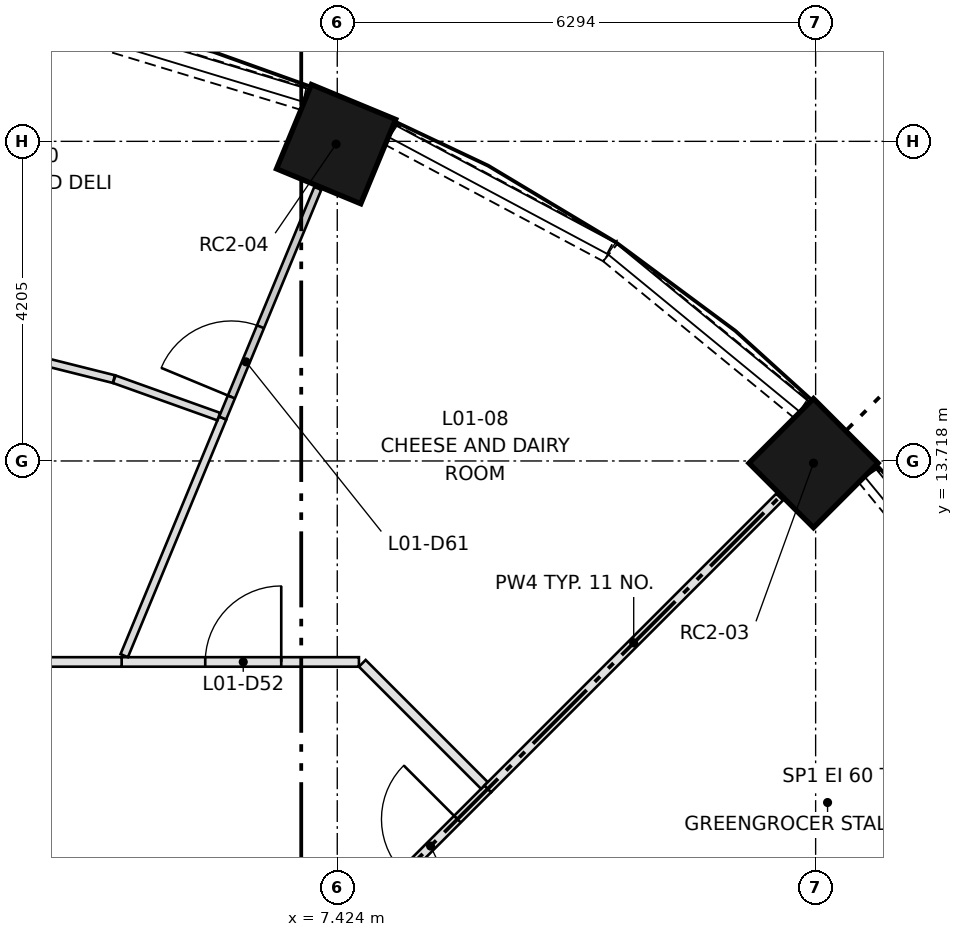
"""IFC4 building model, lengths in metres.
Left out: names, types, materials, properties, quantities, classifications, styles, units other than length and angle.
Written with IfcOpenShell. Run it as: python <this file> out.ifc"""

import sys

from ifc_helpers import new_model, si_unit, direction, frame, frame_2d, origin, origin_2d, place, context, subcontext, project, spatial, rectangle, extrude, element, fill, save


model = new_model("IFC4")
c1 = context("Model", 3, precision=1e-05, world=origin(), true_north=direction((0.0, 1.0)))
c2 = subcontext(c1, "Body", "Model", "MODEL_VIEW")
j1 = project(units=[si_unit("LENGTHUNIT", "METRE"), si_unit("PLANEANGLEUNIT", "RADIAN")], contexts=[c1])
p1 = place(None, origin())
s1 = spatial("IfcSite", under=j1, at=p1, CompositionType="ELEMENT")
p2 = place(p1, origin())
s2 = spatial("IfcBuilding", under=s1, at=p2, CompositionType="ELEMENT")
p3 = place(p2, frame((0.0, 0.0, 5.2)))
s3 = spatial("IfcBuildingStorey", under=s2, at=p3, CompositionType="ELEMENT", Elevation=5.2)
for number, where, z_axis, x_axis in (
    (1, (13.69, 13.69, 0.0), (0.0, 0.0, 1.0), (0.707, 0.707, 0.0)),
    (2, (7.409, 17.886, 0.0), (0.0, 0.0, 1.0), (0.383, 0.924, 0.0)),
):
    element("IfcColumn", number, at=place(p3, frame(where, z_axis=z_axis, x_axis=x_axis)), inside=s3, PredefinedType="COLUMN", context=c2, shape_type="SweptSolid", body=[
        extrude(rectangle(XDim=1.2, YDim=1.2, at=origin_2d()), origin(), (0.0, 0.0, 1.0), 4.7),
    ])
for number, where, z_axis, x_axis in (
    (3, (16.461, 11.018, 0.0), (0.0, 0.0, 1.0), (-0.634, 0.773, 0.0)),
    (4, (13.531, 14.399, 0.0), (0.0, 0.0, 1.0), (-0.773, 0.634, 0.0)),
):
    element("IfcWall", number, at=place(p3, frame(where, z_axis=z_axis, x_axis=x_axis)), inside=s3, PredefinedType="SOLIDWALL", context=c2, shape_type="SweptSolid", body=[
        extrude(rectangle(XDim=3.251, YDim=0.3, at=frame_2d((1.626, 0.0))), origin(), (0.0, 0.0, 1.0), 0.45),
    ])
p4 = place(p3, frame((10.993, 16.478, 0.0), z_axis=(0.0, 0.0, 1.0), x_axis=(-0.881968250723, 0.471308820961, 0.0)))
e5 = element("IfcWall", 5, at=p4, inside=s3, PredefinedType="SOLIDWALL", context=c2, shape_type="SweptSolid", body=[
    extrude(rectangle(XDim=3.252, YDim=0.3, at=frame_2d((1.626, 0.0))), origin(), (0.0, 0.0, 1.0), 0.45),
])
p5 = place(p3, frame((6.99, 18.48, 0.0), z_axis=(0.0, 0.0, 1.0), x_axis=(-0.956935334366, 0.290301164038, 0.0)))
e6 = element("IfcWall", 6, at=p5, inside=s3, PredefinedType="SOLIDWALL", context=c2, shape_type="SweptSolid", body=[
    extrude(rectangle(XDim=3.252, YDim=0.3, at=frame_2d((1.626, 0.0))), origin(), (0.0, 0.0, 1.0), 0.45),
])
p6 = place(p3, frame((7.874, 7.874, 0.0), z_axis=(0.0, 0.0, 1.0), x_axis=(0.707106781187, 0.707106781187, 0.0)))
e7 = element("IfcWall", 7, at=p6, inside=s3, PredefinedType="PARTITIONING", context=c2, shape_type="SweptSolid", body=[
    extrude(rectangle(XDim=2.165, YDim=0.125, at=frame_2d((1.082, 0.0))), origin(), (0.0, 0.0, 1.0), 4.3),
])
p7 = place(p6, frame((0.6, 0.0, 0.0)))
e8 = element("IfcOpeningElement", 8, at=p7, cuts=e7, PredefinedType="OPENING", context=c2, shape_type="SweptSolid", body=[
    extrude(rectangle(XDim=1.0, YDim=2.1, at=frame_2d((0.5, 1.05))), frame((0.0, 0.073, 0.0), z_axis=(0.0, -1.0, 0.0), x_axis=(1.0, 0.0, 0.0)), (0.0, 0.0, 1.0), 0.145),
])
p8 = place(p3, frame((4.587, 11.074, 0.0), z_axis=(0.0, 0.0, 1.0), x_axis=(1.0, 0.0, 0.0)))
e9 = element("IfcWall", 9, at=p8, inside=s3, PredefinedType="PARTITIONING", context=c2, shape_type="SweptSolid", body=[
    extrude(rectangle(XDim=3.122, YDim=0.125, at=frame_2d((1.561, 0.0))), origin(), (0.0, 0.0, 1.0), 4.3),
])
p9 = place(p8, frame((1.1, 0.0, 0.0)))
e10 = element("IfcOpeningElement", 10, at=p9, cuts=e9, PredefinedType="OPENING", context=c2, shape_type="SweptSolid", body=[
    extrude(rectangle(XDim=1.0, YDim=2.1, at=frame_2d((0.5, 1.05))), frame((0.0, 0.073, 0.0), z_axis=(0.0, -1.0, 0.0), x_axis=(1.0, 0.0, 0.0)), (0.0, 0.0, 1.0), 0.145),
])
p10 = place(p3, frame((7.753, 11.056, 0.0), z_axis=(0.0, 0.0, 1.0), x_axis=(0.707106781187, -0.707106781187, 0.0)))
e11 = element("IfcWall", 11, at=p10, inside=s3, PredefinedType="PARTITIONING", context=c2, shape_type="SweptSolid", body=[
    extrude(rectangle(XDim=2.272, YDim=0.125, at=frame_2d((1.136, 0.0))), origin(), (0.0, 0.0, 1.0), 4.3),
])
p11 = place(p3, frame((0.0, 11.074, 0.0), z_axis=(0.0, 0.0, 1.0), x_axis=(1.0, 0.0, 0.0)))
e12 = element("IfcWall", 12, at=p11, inside=s3, PredefinedType="PARTITIONING", context=c2, shape_type="SweptSolid", body=[
    extrude(rectangle(XDim=4.587, YDim=0.125, at=frame_2d((2.293, 0.0))), origin(), (0.0, 0.0, 1.0), 4.3),
])
p12 = place(p11, frame((1.8, 0.0, 0.0)))
e13 = element("IfcOpeningElement", 13, at=p12, cuts=e12, PredefinedType="OPENING", context=c2, shape_type="SweptSolid", body=[
    extrude(rectangle(XDim=1.0, YDim=2.1, at=frame_2d((0.5, 1.05))), frame((0.0, 0.073, 0.0), z_axis=(0.0, -1.0, 0.0), x_axis=(1.0, 0.0, 0.0)), (0.0, 0.0, 1.0), 0.145),
])
p13 = place(p3, frame((9.405, 9.405, 0.0), z_axis=(0.0, 0.0, 1.0), x_axis=(0.707106781187, 0.707106781187, 0.0)))
e14 = element("IfcWall", 14, at=p13, inside=s3, PredefinedType="PARTITIONING", context=c2, shape_type="SweptSolid", body=[
    extrude(rectangle(XDim=5.43, YDim=0.125, at=frame_2d((2.715, 0.0))), origin(), (0.0, 0.0, 1.0), 4.3),
])
p14 = place(p3, frame((4.621, 11.156, 0.0), z_axis=(0.0, 0.0, 1.0), x_axis=(0.382693709436, 0.923875275542, 0.0)))
e15 = element("IfcWall", 15, at=p14, inside=s3, PredefinedType="PARTITIONING", context=c2, shape_type="SweptSolid", body=[
    extrude(rectangle(XDim=3.384, YDim=0.105, at=frame_2d((1.692, 0.0))), origin(), (0.0, 0.0, 1.0), 4.3),
])
p15 = place(p3, frame((5.916, 14.283, 0.0), z_axis=(0.0, 0.0, 1.0), x_axis=(0.382716658507, 0.923865769093, 0.0)))
e16 = element("IfcWall", 16, at=p15, inside=s3, PredefinedType="PARTITIONING", context=c2, shape_type="SweptSolid", body=[
    extrude(rectangle(XDim=3.27, YDim=0.1, at=frame_2d((1.635, 0.0))), origin(), (0.0, 0.0, 1.0), 4.3),
])
p16 = place(p15, frame((0.3, 0.0, 0.0)))
e17 = element("IfcOpeningElement", 17, at=p16, cuts=e16, PredefinedType="OPENING", context=c2, shape_type="SweptSolid", body=[
    extrude(rectangle(XDim=1.0, YDim=2.1, at=frame_2d((0.5, 1.05))), frame((0.0, 0.06, 0.0), z_axis=(0.0, -1.0, 0.0), x_axis=(1.0, 0.0, 0.0)), (0.0, 0.0, 1.0), 0.12),
])
p17 = place(p3, frame((3.019, 15.162, 0.0), z_axis=(0.0, 0.0, 1.0), x_axis=(0.970028424003, -0.242991474388, 0.0)))
e18 = element("IfcWall", 18, at=p17, inside=s3, PredefinedType="PARTITIONING", context=c2, shape_type="SweptSolid", body=[
    extrude(rectangle(XDim=1.512, YDim=0.105, at=frame_2d((0.756, 0.0))), origin(), (0.0, 0.0, 1.0), 4.3),
])
p18 = place(p3, frame((4.49, 14.793, 0.0), z_axis=(0.0, 0.0, 1.0), x_axis=(0.941548755583, -0.336876744314, 0.0)))
e19 = element("IfcWall", 19, at=p18, inside=s3, PredefinedType="PARTITIONING", context=c2, shape_type="SweptSolid", body=[
    extrude(rectangle(XDim=1.459, YDim=0.105, at=frame_2d((0.73, 0.0))), origin(), (0.0, 0.0, 1.0), 4.3),
])
p19 = place(p7, origin())
e20 = element("IfcDoor", 20, at=p19, inside=s3, OperationType="SINGLE_SWING_RIGHT", PredefinedType="DOOR", context=c2, shape_type="SweptSolid", body=[
    extrude(rectangle(XDim=1.0, YDim=2.1, at=frame_2d((0.5, 1.05))), frame((0.0, 0.025, 0.0), z_axis=(0.0, -1.0, 0.0), x_axis=(1.0, 0.0, 0.0)), (0.0, 0.0, 1.0), 0.05),
])
fill(e8, e20)
p20 = place(p9, origin())
e21 = element("IfcDoor", 21, at=p20, inside=s3, OperationType="SINGLE_SWING_RIGHT", PredefinedType="DOOR", context=c2, shape_type="SweptSolid", body=[
    extrude(rectangle(XDim=1.0, YDim=2.1, at=frame_2d((0.5, 1.05))), frame((0.0, 0.025, 0.0), z_axis=(0.0, -1.0, 0.0), x_axis=(1.0, 0.0, 0.0)), (0.0, 0.0, 1.0), 0.05),
])
fill(e10, e21)
p21 = place(p16, origin())
e22 = element("IfcDoor", 22, at=p21, inside=s3, OperationType="SINGLE_SWING_LEFT", PredefinedType="DOOR", context=c2, shape_type="SweptSolid", body=[
    extrude(rectangle(XDim=1.0, YDim=2.1, at=frame_2d((0.5, 1.05))), frame((0.0, 0.025, 0.0), z_axis=(0.0, -1.0, 0.0), x_axis=(1.0, 0.0, 0.0)), (0.0, 0.0, 1.0), 0.05),
])
fill(e17, e22)
save(model, sys.argv[1])
